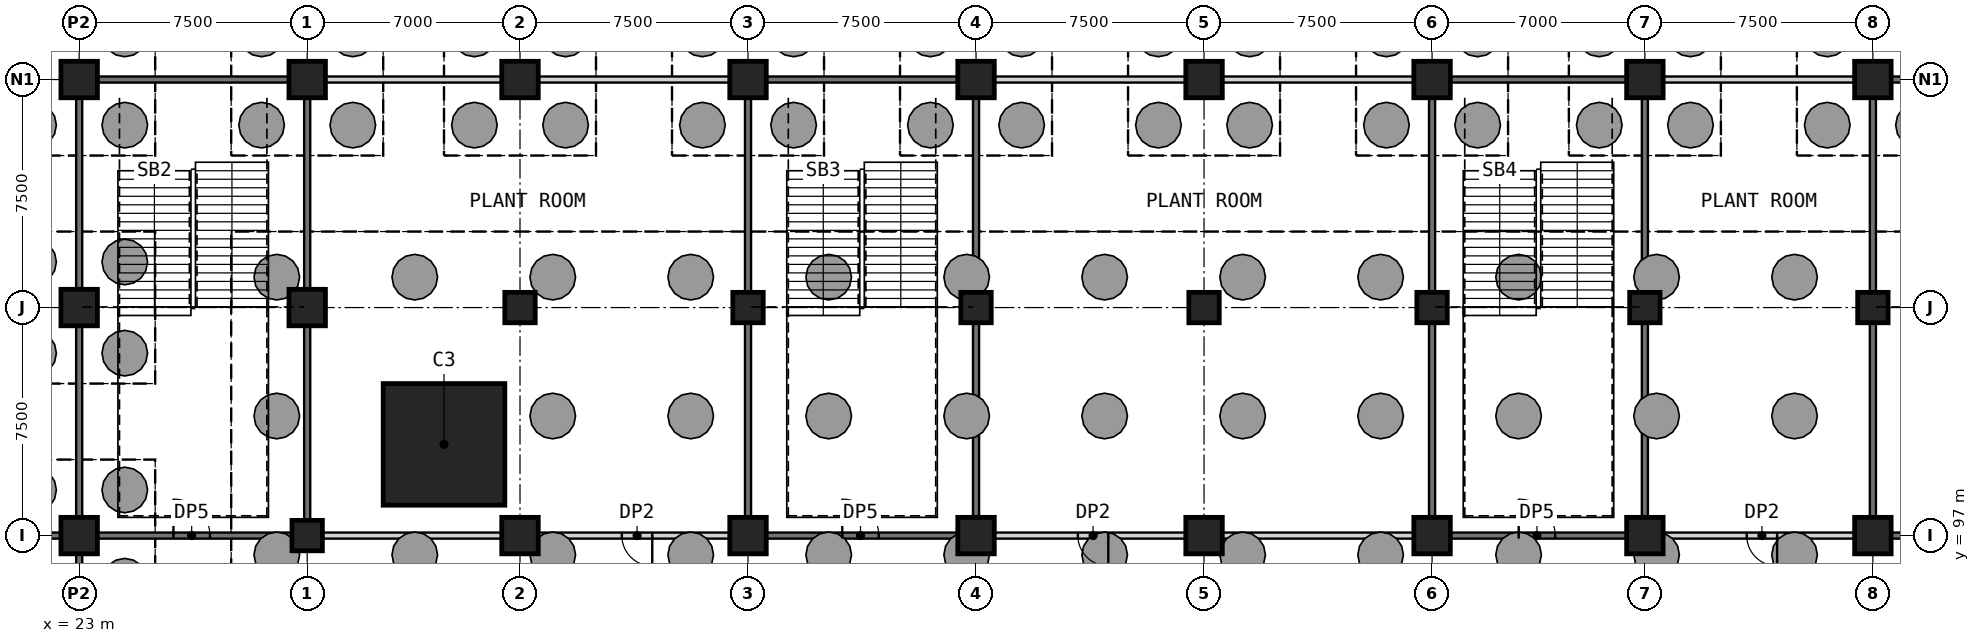
"""IFC4 building model, lengths in metres.
Left out: names, types, materials, properties, quantities, classifications, styles, units other than length and angle.
Written with IfcOpenShell. Run it as: python <this file> out.ifc"""

import sys

from ifc_helpers import new_model, si_unit, direction, frame, frame_2d, origin, origin_2d, place, context, subcontext, project, spatial, rectangle, extrude, element, fill, save


model = new_model("IFC4")
c1 = context("Model", 3, precision=1e-05, world=origin(), true_north=direction((0.0, 1.0)))
c2 = subcontext(c1, "Body", "Model", "MODEL_VIEW")
j1 = project(units=[si_unit("LENGTHUNIT", "METRE"), si_unit("PLANEANGLEUNIT", "RADIAN")], contexts=[c1])
p1 = place(None, origin())
s1 = spatial("IfcSite", under=j1, at=p1, CompositionType="ELEMENT")
p2 = place(p1, origin())
s2 = spatial("IfcBuilding", under=s1, at=p2, CompositionType="ELEMENT")
p3 = place(p2, frame((0.0, 0.0, -12.0)))
s3 = spatial("IfcBuildingStorey", under=s2, at=p3, CompositionType="ELEMENT", Elevation=-12.0)
p4 = place(p3, frame((30.5, 97.0, 0.0), z_axis=(0.0, 0.0, 1.0), x_axis=(1.0, 0.0, 0.0)))
e1 = element("IfcColumn", 1, at=p4, inside=s3, PredefinedType="COLUMN", context=c2, shape_type="SweptSolid", body=[
    extrude(rectangle(XDim=1.0, YDim=1.0, at=origin_2d()), origin(), (0.0, 0.0, 1.0), 6.0),
])
p5 = place(p3, frame((37.5, 97.0, 0.0), z_axis=(0.0, 0.0, 1.0), x_axis=(1.0, 0.0, 0.0)))
e2 = element("IfcColumn", 2, at=p5, inside=s3, PredefinedType="COLUMN", context=c2, shape_type="SweptSolid", body=[
    extrude(rectangle(XDim=1.2, YDim=1.2, at=origin_2d()), origin(), (0.0, 0.0, 1.0), 6.0),
])
p6 = place(p3, frame((37.5, 104.5, 0.0), z_axis=(0.0, 0.0, 1.0), x_axis=(1.0, 0.0, 0.0)))
e3 = element("IfcColumn", 3, at=p6, inside=s3, PredefinedType="COLUMN", context=c2, shape_type="SweptSolid", body=[
    extrude(rectangle(XDim=1.0, YDim=1.0, at=origin_2d()), origin(), (0.0, 0.0, 1.0), 6.0),
])
p7 = place(p3, frame((45.0, 97.0, 0.0), z_axis=(0.0, 0.0, 1.0), x_axis=(1.0, 0.0, 0.0)))
e4 = element("IfcColumn", 4, at=p7, inside=s3, PredefinedType="COLUMN", context=c2, shape_type="SweptSolid", body=[
    extrude(rectangle(XDim=1.2, YDim=1.2, at=origin_2d()), origin(), (0.0, 0.0, 1.0), 6.0),
])
p8 = place(p3, frame((45.0, 104.5, 0.0), z_axis=(0.0, 0.0, 1.0), x_axis=(1.0, 0.0, 0.0)))
e5 = element("IfcColumn", 5, at=p8, inside=s3, PredefinedType="COLUMN", context=c2, shape_type="SweptSolid", body=[
    extrude(rectangle(XDim=1.0, YDim=1.0, at=origin_2d()), origin(), (0.0, 0.0, 1.0), 6.0),
])
p9 = place(p3, frame((52.5, 97.0, 0.0), z_axis=(0.0, 0.0, 1.0), x_axis=(1.0, 0.0, 0.0)))
e6 = element("IfcColumn", 6, at=p9, inside=s3, PredefinedType="COLUMN", context=c2, shape_type="SweptSolid", body=[
    extrude(rectangle(XDim=1.2, YDim=1.2, at=origin_2d()), origin(), (0.0, 0.0, 1.0), 6.0),
])
p10 = place(p3, frame((52.5, 104.5, 0.0), z_axis=(0.0, 0.0, 1.0), x_axis=(1.0, 0.0, 0.0)))
e7 = element("IfcColumn", 7, at=p10, inside=s3, PredefinedType="COLUMN", context=c2, shape_type="SweptSolid", body=[
    extrude(rectangle(XDim=1.0, YDim=1.0, at=origin_2d()), origin(), (0.0, 0.0, 1.0), 6.0),
])
p11 = place(p3, frame((60.0, 97.0, 0.0), z_axis=(0.0, 0.0, 1.0), x_axis=(1.0, 0.0, 0.0)))
e8 = element("IfcColumn", 8, at=p11, inside=s3, PredefinedType="COLUMN", context=c2, shape_type="SweptSolid", body=[
    extrude(rectangle(XDim=1.2, YDim=1.2, at=origin_2d()), origin(), (0.0, 0.0, 1.0), 6.0),
])
p12 = place(p3, frame((60.0, 104.5, 0.0), z_axis=(0.0, 0.0, 1.0), x_axis=(1.0, 0.0, 0.0)))
e9 = element("IfcColumn", 9, at=p12, inside=s3, PredefinedType="COLUMN", context=c2, shape_type="SweptSolid", body=[
    extrude(rectangle(XDim=1.0, YDim=1.0, at=origin_2d()), origin(), (0.0, 0.0, 1.0), 6.0),
])
p13 = place(p3, frame((67.5, 97.0, 0.0), z_axis=(0.0, 0.0, 1.0), x_axis=(1.0, 0.0, 0.0)))
e10 = element("IfcColumn", 10, at=p13, inside=s3, PredefinedType="COLUMN", context=c2, shape_type="SweptSolid", body=[
    extrude(rectangle(XDim=1.2, YDim=1.2, at=origin_2d()), origin(), (0.0, 0.0, 1.0), 6.0),
])
p14 = place(p3, frame((67.5, 104.5, 0.0), z_axis=(0.0, 0.0, 1.0), x_axis=(1.0, 0.0, 0.0)))
e11 = element("IfcColumn", 11, at=p14, inside=s3, PredefinedType="COLUMN", context=c2, shape_type="SweptSolid", body=[
    extrude(rectangle(XDim=1.0, YDim=1.0, at=origin_2d()), origin(), (0.0, 0.0, 1.0), 6.0),
])
p15 = place(p3, frame((74.5, 97.0, 0.0), z_axis=(0.0, 0.0, 1.0), x_axis=(1.0, 0.0, 0.0)))
e12 = element("IfcColumn", 12, at=p15, inside=s3, PredefinedType="COLUMN", context=c2, shape_type="SweptSolid", body=[
    extrude(rectangle(XDim=1.2, YDim=1.2, at=origin_2d()), origin(), (0.0, 0.0, 1.0), 6.0),
])
p16 = place(p3, frame((74.5, 104.5, 0.0), z_axis=(0.0, 0.0, 1.0), x_axis=(1.0, 0.0, 0.0)))
e13 = element("IfcColumn", 13, at=p16, inside=s3, PredefinedType="COLUMN", context=c2, shape_type="SweptSolid", body=[
    extrude(rectangle(XDim=1.0, YDim=1.0, at=origin_2d()), origin(), (0.0, 0.0, 1.0), 6.0),
])
p17 = place(p3, frame((82.0, 97.0, 0.0), z_axis=(0.0, 0.0, 1.0), x_axis=(1.0, 0.0, 0.0)))
e14 = element("IfcColumn", 14, at=p17, inside=s3, PredefinedType="COLUMN", context=c2, shape_type="SweptSolid", body=[
    extrude(rectangle(XDim=1.2, YDim=1.2, at=origin_2d()), origin(), (0.0, 0.0, 1.0), 6.0),
])
p18 = place(p3, frame((82.0, 104.5, 0.0), z_axis=(0.0, 0.0, 1.0), x_axis=(1.0, 0.0, 0.0)))
e15 = element("IfcColumn", 15, at=p18, inside=s3, PredefinedType="COLUMN", context=c2, shape_type="SweptSolid", body=[
    extrude(rectangle(XDim=1.0, YDim=1.0, at=origin_2d()), origin(), (0.0, 0.0, 1.0), 6.0),
])
p19 = place(p3, frame((35.0, 100.0, 0.0), z_axis=(0.0, 0.0, 1.0), x_axis=(1.0, 0.0, 0.0)))
e16 = element("IfcColumn", 16, at=p19, inside=s3, PredefinedType="COLUMN", context=c2, shape_type="SweptSolid", body=[
    extrude(rectangle(XDim=4.0, YDim=4.0, at=origin_2d()), origin(), (0.0, 0.0, 1.0), 6.0),
])
for number, where, z_axis, x_axis in (
    (17, (23.0, 97.0, 0.0), (0.0, 0.0, 1.0), (1.0, 0.0, 0.0)),
    (18, (23.0, 104.5, 0.0), (0.0, 0.0, 1.0), (1.0, 0.0, 0.0)),
    (19, (23.0, 112.0, 0.0), (0.0, 0.0, 1.0), (1.0, 0.0, 0.0)),
    (20, (30.5, 104.5, 0.0), (0.0, 0.0, 1.0), (1.0, 0.0, 0.0)),
    (21, (30.5, 112.0, 0.0), (0.0, 0.0, 1.0), (1.0, 0.0, 0.0)),
    (22, (37.5, 112.0, 0.0), (0.0, 0.0, 1.0), (1.0, 0.0, 0.0)),
    (23, (45.0, 112.0, 0.0), (0.0, 0.0, 1.0), (1.0, 0.0, 0.0)),
    (24, (52.5, 112.0, 0.0), (0.0, 0.0, 1.0), (1.0, 0.0, 0.0)),
    (25, (60.0, 112.0, 0.0), (0.0, 0.0, 1.0), (1.0, 0.0, 0.0)),
    (26, (67.5, 112.0, 0.0), (0.0, 0.0, 1.0), (1.0, 0.0, 0.0)),
    (27, (74.5, 112.0, 0.0), (0.0, 0.0, 1.0), (1.0, 0.0, 0.0)),
    (28, (82.0, 112.0, 0.0), (0.0, 0.0, 1.0), (1.0, 0.0, 0.0)),
):
    element("IfcColumn", number, at=place(p3, frame(where, z_axis=z_axis, x_axis=x_axis)), inside=s3, PredefinedType="COLUMN", context=c2, shape_type="SweptSolid", body=[
        extrude(rectangle(XDim=1.2, YDim=1.2, at=origin_2d()), origin(), (0.0, 0.0, 1.0), 6.0),
    ])
p20 = place(p3, frame((16.1, 97.0, 0.0), z_axis=(0.0, 0.0, 1.0), x_axis=(1.0, 0.0, 0.0)))
e29 = element("IfcWall", 29, at=p20, inside=s3, PredefinedType="SHEAR", context=c2, shape_type="SweptSolid", body=[
    extrude(rectangle(XDim=6.3, YDim=0.2, at=frame_2d((3.15, 0.0))), origin(), (0.0, 0.0, 1.0), 5.4),
])
p21 = place(p3, frame((23.6, 97.0, 0.0), z_axis=(0.0, 0.0, 1.0), x_axis=(1.0, 0.0, 0.0)))
e30 = element("IfcWall", 30, at=p21, inside=s3, PredefinedType="SHEAR", context=c2, shape_type="SweptSolid", body=[
    extrude(rectangle(XDim=6.4, YDim=0.2, at=frame_2d((3.2, 0.0))), origin(), (0.0, 0.0, 1.0), 5.4),
])
p22 = place(p21, frame((2.5, 0.0, 0.0)))
e31 = element("IfcOpeningElement", 31, at=p22, cuts=e30, PredefinedType="OPENING", context=c2, shape_type="SweptSolid", body=[
    extrude(rectangle(XDim=1.2, YDim=2.1, at=frame_2d((0.6, 1.05))), frame((0.0, 0.11, 0.0), z_axis=(0.0, -1.0, 0.0), x_axis=(1.0, 0.0, 0.0)), (0.0, 0.0, 1.0), 0.22),
])
p23 = place(p3, frame((31.0, 97.0, 0.0), z_axis=(0.0, 0.0, 1.0), x_axis=(1.0, 0.0, 0.0)))
e32 = element("IfcWall", 32, at=p23, inside=s3, PredefinedType="PARTITIONING", context=c2, shape_type="SweptSolid", body=[
    extrude(rectangle(XDim=5.9, YDim=0.2, at=frame_2d((2.95, 0.0))), origin(), (0.0, 0.0, 1.0), 5.4),
])
p24 = place(p3, frame((44.4, 97.0, 0.0), z_axis=(0.0, 0.0, 1.0), x_axis=(-1.0, 0.0, 0.0)))
e33 = element("IfcWall", 33, at=p24, inside=s3, PredefinedType="PARTITIONING", context=c2, shape_type="SweptSolid", body=[
    extrude(rectangle(XDim=6.3, YDim=0.2, at=frame_2d((3.15, 0.0))), origin(), (0.0, 0.0, 1.0), 5.4),
])
p25 = place(p24, frame((2.55, 0.0, 0.0)))
e34 = element("IfcOpeningElement", 34, at=p25, cuts=e33, PredefinedType="OPENING", context=c2, shape_type="SweptSolid", body=[
    extrude(rectangle(XDim=1.0, YDim=2.1, at=frame_2d((0.5, 1.05))), frame((0.0, 0.11, 0.0), z_axis=(0.0, -1.0, 0.0), x_axis=(1.0, 0.0, 0.0)), (0.0, 0.0, 1.0), 0.22),
])
p26 = place(p3, frame((45.6, 97.0, 0.0), z_axis=(0.0, 0.0, 1.0), x_axis=(1.0, 0.0, 0.0)))
e35 = element("IfcWall", 35, at=p26, inside=s3, PredefinedType="SHEAR", context=c2, shape_type="SweptSolid", body=[
    extrude(rectangle(XDim=6.3, YDim=0.2, at=frame_2d((3.15, 0.0))), origin(), (0.0, 0.0, 1.0), 5.4),
])
p27 = place(p26, frame((2.5, 0.0, 0.0)))
e36 = element("IfcOpeningElement", 36, at=p27, cuts=e35, PredefinedType="OPENING", context=c2, shape_type="SweptSolid", body=[
    extrude(rectangle(XDim=1.2, YDim=2.1, at=frame_2d((0.6, 1.05))), frame((0.0, 0.11, 0.0), z_axis=(0.0, -1.0, 0.0), x_axis=(1.0, 0.0, 0.0)), (0.0, 0.0, 1.0), 0.22),
])
p28 = place(p3, frame((59.4, 97.0, 0.0), z_axis=(0.0, 0.0, 1.0), x_axis=(-1.0, 0.0, 0.0)))
e37 = element("IfcWall", 37, at=p28, inside=s3, PredefinedType="PARTITIONING", context=c2, shape_type="SweptSolid", body=[
    extrude(rectangle(XDim=6.3, YDim=0.2, at=frame_2d((3.15, 0.0))), origin(), (0.0, 0.0, 1.0), 5.4),
])
p29 = place(p28, frame((2.55, 0.0, 0.0)))
e38 = element("IfcOpeningElement", 38, at=p29, cuts=e37, PredefinedType="OPENING", context=c2, shape_type="SweptSolid", body=[
    extrude(rectangle(XDim=1.0, YDim=2.1, at=frame_2d((0.5, 1.05))), frame((0.0, 0.11, 0.0), z_axis=(0.0, -1.0, 0.0), x_axis=(1.0, 0.0, 0.0)), (0.0, 0.0, 1.0), 0.22),
])
p30 = place(p3, frame((60.6, 97.0, 0.0), z_axis=(0.0, 0.0, 1.0), x_axis=(1.0, 0.0, 0.0)))
e39 = element("IfcWall", 39, at=p30, inside=s3, PredefinedType="PARTITIONING", context=c2, shape_type="SweptSolid", body=[
    extrude(rectangle(XDim=6.3, YDim=0.2, at=frame_2d((3.15, 0.0))), origin(), (0.0, 0.0, 1.0), 5.4),
])
p31 = place(p3, frame((68.1, 97.0, 0.0), z_axis=(0.0, 0.0, 1.0), x_axis=(1.0, 0.0, 0.0)))
e40 = element("IfcWall", 40, at=p31, inside=s3, PredefinedType="SHEAR", context=c2, shape_type="SweptSolid", body=[
    extrude(rectangle(XDim=5.8, YDim=0.2, at=frame_2d((2.9, 0.0))), origin(), (0.0, 0.0, 1.0), 5.4),
])
p32 = place(p31, frame((2.25, 0.0, 0.0)))
e41 = element("IfcOpeningElement", 41, at=p32, cuts=e40, PredefinedType="OPENING", context=c2, shape_type="SweptSolid", body=[
    extrude(rectangle(XDim=1.2, YDim=2.1, at=frame_2d((0.6, 1.05))), frame((0.0, 0.11, 0.0), z_axis=(0.0, -1.0, 0.0), x_axis=(1.0, 0.0, 0.0)), (0.0, 0.0, 1.0), 0.22),
])
p33 = place(p3, frame((81.4, 97.0, 0.0), z_axis=(0.0, 0.0, 1.0), x_axis=(-1.0, 0.0, 0.0)))
e42 = element("IfcWall", 42, at=p33, inside=s3, PredefinedType="PARTITIONING", context=c2, shape_type="SweptSolid", body=[
    extrude(rectangle(XDim=6.3, YDim=0.2, at=frame_2d((3.15, 0.0))), origin(), (0.0, 0.0, 1.0), 5.4),
])
p34 = place(p33, frame((2.55, 0.0, 0.0)))
e43 = element("IfcOpeningElement", 43, at=p34, cuts=e42, PredefinedType="OPENING", context=c2, shape_type="SweptSolid", body=[
    extrude(rectangle(XDim=1.0, YDim=2.1, at=frame_2d((0.5, 1.05))), frame((0.0, 0.11, 0.0), z_axis=(0.0, -1.0, 0.0), x_axis=(1.0, 0.0, 0.0)), (0.0, 0.0, 1.0), 0.22),
])
p35 = place(p3, frame((82.6, 97.0, 0.0), z_axis=(0.0, 0.0, 1.0), x_axis=(1.0, 0.0, 0.0)))
e44 = element("IfcWall", 44, at=p35, inside=s3, PredefinedType="SHEAR", context=c2, shape_type="SweptSolid", body=[
    extrude(rectangle(XDim=6.4, YDim=0.2, at=frame_2d((3.2, 0.0))), origin(), (0.0, 0.0, 1.0), 5.4),
])
p36 = place(p35, frame((4.5, 0.0, 0.0)))
e45 = element("IfcOpeningElement", 45, at=p36, cuts=e44, PredefinedType="OPENING", context=c2, shape_type="SweptSolid", body=[
    extrude(rectangle(XDim=1.2, YDim=2.1, at=frame_2d((0.6, 1.05))), frame((0.0, 0.11, 0.0), z_axis=(0.0, -1.0, 0.0), x_axis=(1.0, 0.0, 0.0)), (0.0, 0.0, 1.0), 0.22),
])
p37 = place(p3, frame((23.6, 112.0, 0.0), z_axis=(0.0, 0.0, 1.0), x_axis=(1.0, 0.0, 0.0)))
e46 = element("IfcWall", 46, at=p37, inside=s3, PredefinedType="SHEAR", context=c2, shape_type="SweptSolid", body=[
    extrude(rectangle(XDim=6.3, YDim=0.2, at=frame_2d((3.15, 0.0))), origin(), (0.0, 0.0, 1.0), 5.4),
])
p38 = place(p3, frame((31.1, 112.0, 0.0), z_axis=(0.0, 0.0, 1.0), x_axis=(1.0, 0.0, 0.0)))
e47 = element("IfcWall", 47, at=p38, inside=s3, PredefinedType="PARTITIONING", context=c2, shape_type="SweptSolid", body=[
    extrude(rectangle(XDim=5.8, YDim=0.2, at=frame_2d((2.9, 0.0))), origin(), (0.0, 0.0, 1.0), 5.4),
])
p39 = place(p3, frame((38.1, 112.0, 0.0), z_axis=(0.0, 0.0, 1.0), x_axis=(1.0, 0.0, 0.0)))
e48 = element("IfcWall", 48, at=p39, inside=s3, PredefinedType="PARTITIONING", context=c2, shape_type="SweptSolid", body=[
    extrude(rectangle(XDim=6.3, YDim=0.2, at=frame_2d((3.15, 0.0))), origin(), (0.0, 0.0, 1.0), 5.4),
])
p40 = place(p3, frame((45.6, 112.0, 0.0), z_axis=(0.0, 0.0, 1.0), x_axis=(1.0, 0.0, 0.0)))
e49 = element("IfcWall", 49, at=p40, inside=s3, PredefinedType="SHEAR", context=c2, shape_type="SweptSolid", body=[
    extrude(rectangle(XDim=6.3, YDim=0.2, at=frame_2d((3.15, 0.0))), origin(), (0.0, 0.0, 1.0), 5.4),
])
for number, where, z_axis, x_axis in (
    (50, (53.1, 112.0, 0.0), (0.0, 0.0, 1.0), (1.0, 0.0, 0.0)),
    (51, (60.6, 112.0, 0.0), (0.0, 0.0, 1.0), (1.0, 0.0, 0.0)),
):
    element("IfcWall", number, at=place(p3, frame(where, z_axis=z_axis, x_axis=x_axis)), inside=s3, PredefinedType="PARTITIONING", context=c2, shape_type="SweptSolid", body=[
        extrude(rectangle(XDim=6.3, YDim=0.2, at=frame_2d((3.15, 0.0))), origin(), (0.0, 0.0, 1.0), 5.4),
    ])
p41 = place(p3, frame((68.1, 112.0, 0.0), z_axis=(0.0, 0.0, 1.0), x_axis=(1.0, 0.0, 0.0)))
e52 = element("IfcWall", 52, at=p41, inside=s3, PredefinedType="SHEAR", context=c2, shape_type="SweptSolid", body=[
    extrude(rectangle(XDim=5.8, YDim=0.2, at=frame_2d((2.9, 0.0))), origin(), (0.0, 0.0, 1.0), 5.4),
])
p42 = place(p3, frame((75.1, 112.0, 0.0), z_axis=(0.0, 0.0, 1.0), x_axis=(1.0, 0.0, 0.0)))
e53 = element("IfcWall", 53, at=p42, inside=s3, PredefinedType="PARTITIONING", context=c2, shape_type="SweptSolid", body=[
    extrude(rectangle(XDim=6.3, YDim=0.2, at=frame_2d((3.15, 0.0))), origin(), (0.0, 0.0, 1.0), 5.4),
])
p43 = place(p3, frame((82.6, 112.0, 0.0), z_axis=(0.0, 0.0, 1.0), x_axis=(1.0, 0.0, 0.0)))
e54 = element("IfcWall", 54, at=p43, inside=s3, PredefinedType="SHEAR", context=c2, shape_type="SweptSolid", body=[
    extrude(rectangle(XDim=6.3, YDim=0.2, at=frame_2d((3.15, 0.0))), origin(), (0.0, 0.0, 1.0), 5.4),
])
p44 = place(p3, frame((23.0, 90.6, 0.0), z_axis=(0.0, 0.0, 1.0), x_axis=(0.0, 1.0, 0.0)))
e55 = element("IfcWall", 55, at=p44, inside=s3, PredefinedType="SHEAR", context=c2, shape_type="SweptSolid", body=[
    extrude(rectangle(XDim=5.8, YDim=0.2, at=frame_2d((2.9, 0.0))), origin(), (0.0, 0.0, 1.0), 5.4),
])
p45 = place(p44, frame((2.25, 0.0, 0.0)))
e56 = element("IfcOpeningElement", 56, at=p45, cuts=e55, PredefinedType="OPENING", context=c2, shape_type="SweptSolid", body=[
    extrude(rectangle(XDim=1.2, YDim=2.1, at=frame_2d((0.6, 1.05))), frame((0.0, 0.11, 0.0), z_axis=(0.0, -1.0, 0.0), x_axis=(1.0, 0.0, 0.0)), (0.0, 0.0, 1.0), 0.22),
])
for number, where, z_axis, x_axis in (
    (57, (23.0, 97.6, 0.0), (0.0, 0.0, 1.0), (0.0, 1.0, 0.0)),
    (58, (23.0, 105.1, 0.0), (0.0, 0.0, 1.0), (0.0, 1.0, 0.0)),
):
    element("IfcWall", number, at=place(p3, frame(where, z_axis=z_axis, x_axis=x_axis)), inside=s3, PredefinedType="SHEAR", context=c2, shape_type="SweptSolid", body=[
        extrude(rectangle(XDim=6.3, YDim=0.2, at=frame_2d((3.15, 0.0))), origin(), (0.0, 0.0, 1.0), 5.4),
    ])
p46 = place(p3, frame((30.5, 97.5, 0.0), z_axis=(0.0, 0.0, 1.0), x_axis=(0.0, 1.0, 0.0)))
e59 = element("IfcWall", 59, at=p46, inside=s3, PredefinedType="SHEAR", context=c2, shape_type="SweptSolid", body=[
    extrude(rectangle(XDim=6.4, YDim=0.2, at=frame_2d((3.2, 0.0))), origin(), (0.0, 0.0, 1.0), 5.4),
])
p47 = place(p3, frame((30.5, 105.1, 0.0), z_axis=(0.0, 0.0, 1.0), x_axis=(0.0, 1.0, 0.0)))
e60 = element("IfcWall", 60, at=p47, inside=s3, PredefinedType="SHEAR", context=c2, shape_type="SweptSolid", body=[
    extrude(rectangle(XDim=6.3, YDim=0.2, at=frame_2d((3.15, 0.0))), origin(), (0.0, 0.0, 1.0), 5.4),
])
for number, where, z_axis, x_axis in (
    (61, (45.0, 97.6, 0.0), (0.0, 0.0, 1.0), (0.0, 1.0, 0.0)),
    (62, (45.0, 105.0, 0.0), (0.0, 0.0, 1.0), (0.0, 1.0, 0.0)),
    (63, (52.5, 97.6, 0.0), (0.0, 0.0, 1.0), (0.0, 1.0, 0.0)),
    (64, (52.5, 105.0, 0.0), (0.0, 0.0, 1.0), (0.0, 1.0, 0.0)),
    (65, (67.5, 97.6, 0.0), (0.0, 0.0, 1.0), (0.0, 1.0, 0.0)),
    (66, (67.5, 105.0, 0.0), (0.0, 0.0, 1.0), (0.0, 1.0, 0.0)),
    (67, (74.5, 97.6, 0.0), (0.0, 0.0, 1.0), (0.0, 1.0, 0.0)),
    (68, (74.5, 105.0, 0.0), (0.0, 0.0, 1.0), (0.0, 1.0, 0.0)),
    (69, (82.0, 97.6, 0.0), (0.0, 0.0, 1.0), (0.0, 1.0, 0.0)),
    (70, (82.0, 105.0, 0.0), (0.0, 0.0, 1.0), (0.0, 1.0, 0.0)),
):
    element("IfcWall", number, at=place(p3, frame(where, z_axis=z_axis, x_axis=x_axis)), inside=s3, PredefinedType="SHEAR", context=c2, shape_type="SweptSolid", body=[
        extrude(rectangle(XDim=6.4, YDim=0.2, at=frame_2d((3.2, 0.0))), origin(), (0.0, 0.0, 1.0), 5.4),
    ])
p48 = place(p22, origin())
e71 = element("IfcDoor", 71, at=p48, inside=s3, OperationType="SINGLE_SWING_LEFT", PredefinedType="DOOR", context=c2, shape_type="SweptSolid", body=[
    extrude(rectangle(XDim=1.2, YDim=2.1, at=frame_2d((0.6, 1.05))), frame((0.0, 0.025, 0.0), z_axis=(0.0, -1.0, 0.0), x_axis=(1.0, 0.0, 0.0)), (0.0, 0.0, 1.0), 0.05),
])
fill(e31, e71)
p49 = place(p25, origin())
e72 = element("IfcDoor", 72, at=p49, inside=s3, OperationType="SINGLE_SWING_LEFT", PredefinedType="DOOR", context=c2, shape_type="SweptSolid", body=[
    extrude(rectangle(XDim=1.0, YDim=2.1, at=frame_2d((0.5, 1.05))), frame((0.0, 0.025, 0.0), z_axis=(0.0, -1.0, 0.0), x_axis=(1.0, 0.0, 0.0)), (0.0, 0.0, 1.0), 0.05),
])
fill(e34, e72)
p50 = place(p27, origin())
e73 = element("IfcDoor", 73, at=p50, inside=s3, OperationType="SINGLE_SWING_LEFT", PredefinedType="DOOR", context=c2, shape_type="SweptSolid", body=[
    extrude(rectangle(XDim=1.2, YDim=2.1, at=frame_2d((0.6, 1.05))), frame((0.0, 0.025, 0.0), z_axis=(0.0, -1.0, 0.0), x_axis=(1.0, 0.0, 0.0)), (0.0, 0.0, 1.0), 0.05),
])
fill(e36, e73)
p51 = place(p29, origin())
e74 = element("IfcDoor", 74, at=p51, inside=s3, OperationType="SINGLE_SWING_LEFT", PredefinedType="DOOR", context=c2, shape_type="SweptSolid", body=[
    extrude(rectangle(XDim=1.0, YDim=2.1, at=frame_2d((0.5, 1.05))), frame((0.0, 0.025, 0.0), z_axis=(0.0, -1.0, 0.0), x_axis=(1.0, 0.0, 0.0)), (0.0, 0.0, 1.0), 0.05),
])
fill(e38, e74)
p52 = place(p32, origin())
e75 = element("IfcDoor", 75, at=p52, inside=s3, OperationType="SINGLE_SWING_LEFT", PredefinedType="DOOR", context=c2, shape_type="SweptSolid", body=[
    extrude(rectangle(XDim=1.2, YDim=2.1, at=frame_2d((0.6, 1.05))), frame((0.0, 0.025, 0.0), z_axis=(0.0, -1.0, 0.0), x_axis=(1.0, 0.0, 0.0)), (0.0, 0.0, 1.0), 0.05),
])
fill(e41, e75)
p53 = place(p34, origin())
e76 = element("IfcDoor", 76, at=p53, inside=s3, OperationType="SINGLE_SWING_LEFT", PredefinedType="DOOR", context=c2, shape_type="SweptSolid", body=[
    extrude(rectangle(XDim=1.0, YDim=2.1, at=frame_2d((0.5, 1.05))), frame((0.0, 0.025, 0.0), z_axis=(0.0, -1.0, 0.0), x_axis=(1.0, 0.0, 0.0)), (0.0, 0.0, 1.0), 0.05),
])
fill(e43, e76)
save(model, sys.argv[1])
